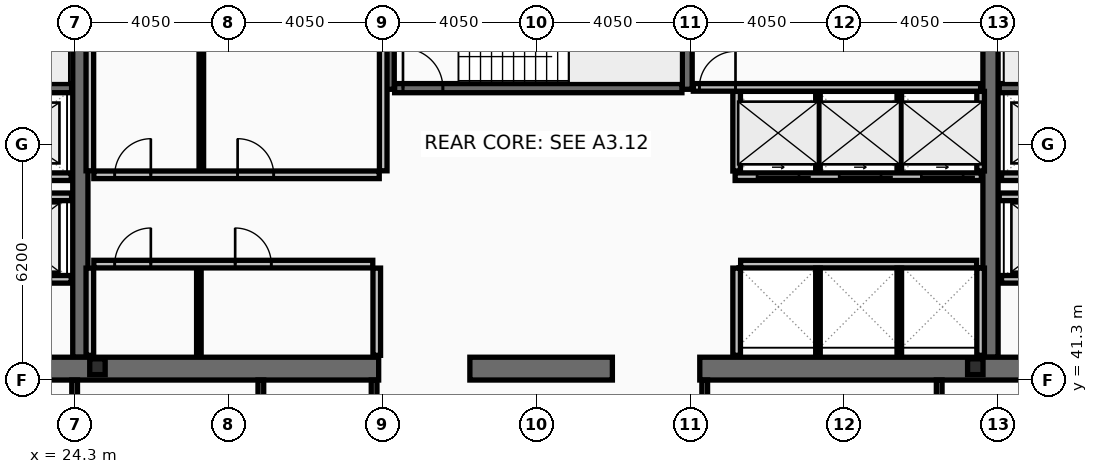
"""IFC4 building model, lengths in metres.
Left out: names, types, materials, properties, quantities, classifications, styles, units other than length and angle.
Written with IfcOpenShell. Run it as: python <this file> out.ifc"""

import sys

from ifc_helpers import new_model, si_unit, direction, frame, frame_2d, origin, origin_2d, place, context, subcontext, project, spatial, rectangle, i_section, extrude, element, fill, save


model = new_model("IFC4")
c1 = context("Model", 3, precision=1e-05, world=origin(), true_north=direction((0.0, 1.0)))
c2 = subcontext(c1, "Body", "Model", "MODEL_VIEW")
j1 = project(units=[si_unit("LENGTHUNIT", "METRE"), si_unit("PLANEANGLEUNIT", "RADIAN")], contexts=[c1])
p1 = place(None, origin())
s1 = spatial("IfcSite", under=j1, at=p1, CompositionType="ELEMENT")
p2 = place(p1, origin())
s2 = spatial("IfcBuilding", under=s1, at=p2, CompositionType="ELEMENT")
p3 = place(p2, frame((0.0, 0.0, 253.4)))
s3 = spatial("IfcBuildingStorey", under=s2, at=p3, CompositionType="ELEMENT", Elevation=253.4)
for number, where, z_axis, x_axis in (
    (1, (24.45, 41.9, 0.0), (0.0, 0.0, 1.0), (0.0, 1.0, 0.0)),
    (2, (48.4, 41.9, 0.0), (0.0, 0.0, 1.0), (0.0, 1.0, 0.0)),
):
    element("IfcWall", number, at=place(p3, frame(where, z_axis=z_axis, x_axis=x_axis)), inside=s3, PredefinedType="SHEAR", context=c2, shape_type="SweptSolid", body=[
        extrude(rectangle(XDim=11.2, YDim=0.4, at=frame_2d((5.6, 0.0))), origin(), (0.0, 0.0, 1.0), 3.38),
    ])
p4 = place(p3, frame((32.3, 41.6, 0.0), z_axis=(0.0, 0.0, 1.0), x_axis=(-1.0, 0.0, 0.0)))
e3 = element("IfcWall", 3, at=p4, inside=s3, PredefinedType="SHEAR", context=c2, shape_type="SweptSolid", body=[
    extrude(rectangle(XDim=11.45, YDim=0.6, at=frame_2d((5.725, 0.0))), origin(), (0.0, 0.0, 1.0), 3.38),
])
p5 = place(p3, frame((38.45, 41.6, 0.0), z_axis=(0.0, 0.0, 1.0), x_axis=(-1.0, 0.0, 0.0)))
e4 = element("IfcWall", 4, at=p5, inside=s3, PredefinedType="SHEAR", context=c2, shape_type="SweptSolid", body=[
    extrude(rectangle(XDim=3.75, YDim=0.6, at=frame_2d((1.875, 0.0))), origin(), (0.0, 0.0, 1.0), 3.38),
])
p6 = place(p3, frame((52.05, 41.6, 0.0), z_axis=(0.0, 0.0, 1.0), x_axis=(-1.0, 0.0, 0.0)))
e5 = element("IfcWall", 5, at=p6, inside=s3, PredefinedType="SHEAR", context=c2, shape_type="SweptSolid", body=[
    extrude(rectangle(XDim=11.3, YDim=0.6, at=frame_2d((5.65, 0.0))), origin(), (0.0, 0.0, 1.0), 3.38),
])
for number, where, z_axis, x_axis in (
    (6, (32.58, 48.95, 0.0), (0.0, 0.0, 1.0), (0.0, 1.0, 0.0)),
    (7, (40.42, 48.95, 0.0), (0.0, 0.0, 1.0), (0.0, 1.0, 0.0)),
):
    element("IfcWall", number, at=place(p3, frame(where, z_axis=z_axis, x_axis=x_axis)), inside=s3, PredefinedType="SHEAR", context=c2, shape_type="SweptSolid", body=[
        extrude(rectangle(XDim=4.15, YDim=0.26, at=frame_2d((2.075, 0.0))), origin(), (0.0, 0.0, 1.0), 3.38),
    ])
p7 = place(p3, frame((16.8, 48.98, 0.0), z_axis=(0.0, 0.0, 1.0), x_axis=(1.0, 0.0, 0.0)))
e8 = element("IfcWall", 8, at=p7, inside=s3, PredefinedType="SHEAR", context=c2, shape_type="SweptSolid", body=[
    extrude(rectangle(XDim=7.42, YDim=0.24, at=frame_2d((3.71, 0.0))), origin(), (0.0, 0.0, 1.0), 3.38),
])
p8 = place(p7, frame((0.22, 0.0, 0.0)))
e9 = element("IfcOpeningElement", 9, at=p8, cuts=e8, PredefinedType="OPENING", context=c2, shape_type="SweptSolid", body=[
    extrude(rectangle(XDim=1.05, YDim=2.15, at=frame_2d((0.525, 1.075))), frame((0.0, 0.13, 0.0), z_axis=(0.0, -1.0, 0.0), x_axis=(1.0, 0.0, 0.0)), (0.0, 0.0, 1.0), 0.26),
])
p9 = place(p3, frame((48.63, 48.98, 0.0), z_axis=(0.0, 0.0, 1.0), x_axis=(1.0, 0.0, 0.0)))
e10 = element("IfcWall", 10, at=p9, inside=s3, PredefinedType="SHEAR", context=c2, shape_type="SweptSolid", body=[
    extrude(rectangle(XDim=7.47, YDim=0.24, at=frame_2d((3.735, 0.0))), origin(), (0.0, 0.0, 1.0), 3.38),
])
p10 = place(p9, frame((6.2, 0.0, 0.0)))
e11 = element("IfcOpeningElement", 11, at=p10, cuts=e10, PredefinedType="OPENING", context=c2, shape_type="SweptSolid", body=[
    extrude(rectangle(XDim=1.05, YDim=2.15, at=frame_2d((0.525, 1.075))), frame((0.0, 0.13, 0.0), z_axis=(0.0, -1.0, 0.0), x_axis=(1.0, 0.0, 0.0)), (0.0, 0.0, 1.0), 0.26),
])
p11 = place(p3, frame((32.72, 48.98, 0.0), z_axis=(0.0, 0.0, 1.0), x_axis=(1.0, 0.0, 0.0)))
e12 = element("IfcWall", 12, at=p11, inside=s3, PredefinedType="SHEAR", context=c2, shape_type="SweptSolid", body=[
    extrude(rectangle(XDim=7.56, YDim=0.24, at=frame_2d((3.78, 0.0))), origin(), (0.0, 0.0, 1.0), 3.38),
])
p12 = place(p11, frame((0.22, 0.0, 0.0)))
e13 = element("IfcOpeningElement", 13, at=p12, cuts=e12, PredefinedType="OPENING", context=c2, shape_type="SweptSolid", body=[
    extrude(rectangle(XDim=1.05, YDim=2.15, at=frame_2d((0.525, 1.075))), frame((0.0, 0.13, 0.0), z_axis=(0.0, -1.0, 0.0), x_axis=(1.0, 0.0, 0.0)), (0.0, 0.0, 1.0), 0.26),
])
for number, where, z_axis, x_axis in (
    (14, (24.9, 41.65, 0.0), (0.0, 0.0, 1.0), (1.0, 0.0, 0.0)),
    (15, (48.0, 41.65, 0.0), (0.0, 0.0, 1.0), (1.0, 0.0, 0.0)),
):
    element("IfcColumn", number, at=place(p3, frame(where, z_axis=z_axis, x_axis=x_axis)), inside=s3, PredefinedType="COLUMN", context=c2, shape_type="SweptSolid", body=[
        extrude(i_section(OverallWidth=0.406, OverallDepth=0.416, WebThickness=0.03, FlangeThickness=0.048, at=origin_2d()), origin(), (0.0, 0.0, 1.0), 3.6),
    ])
p13 = place(p3, frame((51.61, 43.95, 0.0), z_axis=(0.0, 0.0, 1.0), x_axis=(-1.0, 0.0, 0.0)))
e16 = element("IfcWall", 16, at=p13, inside=s3, PredefinedType="PARTITIONING", context=c2, shape_type="SweptSolid", body=[
    extrude(rectangle(XDim=2.92, YDim=0.2, at=frame_2d((1.46, 0.0))), origin(), (0.0, 0.0, 1.0), 3.38),
])
p14 = place(p13, frame((0.81, 0.0, 0.0)))
e17 = element("IfcOpeningElement", 17, at=p14, cuts=e16, PredefinedType="OPENING", context=c2, shape_type="SweptSolid", body=[
    extrude(rectangle(XDim=1.3, YDim=2.18, at=frame_2d((0.65, 1.09))), frame((0.0, 0.11, 0.0), z_axis=(0.0, -1.0, 0.0), x_axis=(1.0, 0.0, 0.0)), (0.0, 0.0, 1.0), 0.22),
])
p15 = place(p3, frame((24.21, 43.95, 0.0), z_axis=(0.0, 0.0, 1.0), x_axis=(-1.0, 0.0, 0.0)))
e18 = element("IfcWall", 18, at=p15, inside=s3, PredefinedType="PARTITIONING", context=c2, shape_type="SweptSolid", body=[
    extrude(rectangle(XDim=2.97, YDim=0.2, at=frame_2d((1.485, 0.0))), origin(), (0.0, 0.0, 1.0), 3.38),
])
p16 = place(p15, frame((0.86, 0.0, 0.0)))
e19 = element("IfcOpeningElement", 19, at=p16, cuts=e18, PredefinedType="OPENING", context=c2, shape_type="SweptSolid", body=[
    extrude(rectangle(XDim=1.3, YDim=2.18, at=frame_2d((0.65, 1.09))), frame((0.0, 0.11, 0.0), z_axis=(0.0, -1.0, 0.0), x_axis=(1.0, 0.0, 0.0)), (0.0, 0.0, 1.0), 0.22),
])
p17 = place(p3, frame((51.61, 46.65, 0.0), z_axis=(0.0, 0.0, 1.0), x_axis=(-1.0, 0.0, 0.0)))
e20 = element("IfcWall", 20, at=p17, inside=s3, PredefinedType="PARTITIONING", context=c2, shape_type="SweptSolid", body=[
    extrude(rectangle(XDim=2.92, YDim=0.2, at=frame_2d((1.46, 0.0))), origin(), (0.0, 0.0, 1.0), 3.38),
])
p18 = place(p17, frame((0.86, 0.0, 0.0)))
e21 = element("IfcOpeningElement", 21, at=p18, cuts=e20, PredefinedType="OPENING", context=c2, shape_type="SweptSolid", body=[
    extrude(rectangle(XDim=1.2, YDim=2.18, at=frame_2d((0.6, 1.09))), frame((0.0, 0.11, 0.0), z_axis=(0.0, -1.0, 0.0), x_axis=(1.0, 0.0, 0.0)), (0.0, 0.0, 1.0), 0.22),
])
p19 = place(p3, frame((24.21, 46.65, 0.0), z_axis=(0.0, 0.0, 1.0), x_axis=(-1.0, 0.0, 0.0)))
e22 = element("IfcWall", 22, at=p19, inside=s3, PredefinedType="PARTITIONING", context=c2, shape_type="SweptSolid", body=[
    extrude(rectangle(XDim=2.97, YDim=0.2, at=frame_2d((1.485, 0.0))), origin(), (0.0, 0.0, 1.0), 3.38),
])
p20 = place(p19, frame((0.91, 0.0, 0.0)))
e23 = element("IfcOpeningElement", 23, at=p20, cuts=e22, PredefinedType="OPENING", context=c2, shape_type="SweptSolid", body=[
    extrude(rectangle(XDim=1.2, YDim=2.18, at=frame_2d((0.6, 1.09))), frame((0.0, 0.11, 0.0), z_axis=(0.0, -1.0, 0.0), x_axis=(1.0, 0.0, 0.0)), (0.0, 0.0, 1.0), 0.22),
])
p21 = place(p3, frame((48.16, 46.65, 0.0), z_axis=(0.0, 0.0, 1.0), x_axis=(-1.0, 0.0, 0.0)))
e24 = element("IfcWall", 24, at=p21, inside=s3, PredefinedType="PARTITIONING", context=c2, shape_type="SweptSolid", body=[
    extrude(rectangle(XDim=6.48, YDim=0.2, at=frame_2d((3.24, 0.0))), origin(), (0.0, 0.0, 1.0), 3.38),
])
p22 = place(p21, frame((4.8, 0.0, 0.0)))
e25 = element("IfcOpeningElement", 25, at=p22, cuts=e24, PredefinedType="OPENING", context=c2, shape_type="SweptSolid", body=[
    extrude(rectangle(XDim=1.1, YDim=2.18, at=frame_2d((0.55, 1.09))), frame((0.0, 0.11, 0.0), z_axis=(0.0, -1.0, 0.0), x_axis=(1.0, 0.0, 0.0)), (0.0, 0.0, 1.0), 0.22),
])
p23 = place(p21, frame((2.64, 0.0, 0.0)))
e26 = element("IfcOpeningElement", 26, at=p23, cuts=e24, PredefinedType="OPENING", context=c2, shape_type="SweptSolid", body=[
    extrude(rectangle(XDim=1.1, YDim=2.18, at=frame_2d((0.55, 1.09))), frame((0.0, 0.11, 0.0), z_axis=(0.0, -1.0, 0.0), x_axis=(1.0, 0.0, 0.0)), (0.0, 0.0, 1.0), 0.22),
])
p24 = place(p21, frame((0.48, 0.0, 0.0)))
e27 = element("IfcOpeningElement", 27, at=p24, cuts=e24, PredefinedType="OPENING", context=c2, shape_type="SweptSolid", body=[
    extrude(rectangle(XDim=1.1, YDim=2.18, at=frame_2d((0.55, 1.09))), frame((0.0, 0.11, 0.0), z_axis=(0.0, -1.0, 0.0), x_axis=(1.0, 0.0, 0.0)), (0.0, 0.0, 1.0), 0.22),
])
p25 = place(p3, frame((21.2, 46.12, 0.0), z_axis=(0.0, 0.0, 1.0), x_axis=(1.0, 0.0, 0.0)))
e28 = element("IfcWall", 28, at=p25, inside=s3, PredefinedType="PARTITIONING", context=c2, shape_type="SweptSolid", body=[
    extrude(rectangle(XDim=3.02, YDim=0.2, at=frame_2d((1.51, 0.0))), origin(), (0.0, 0.0, 1.0), 3.38),
])
p26 = place(p3, frame((48.63, 46.12, 0.0), z_axis=(0.0, 0.0, 1.0), x_axis=(1.0, 0.0, 0.0)))
e29 = element("IfcWall", 29, at=p26, inside=s3, PredefinedType="PARTITIONING", context=c2, shape_type="SweptSolid", body=[
    extrude(rectangle(XDim=3.07, YDim=0.2, at=frame_2d((1.535, 0.0))), origin(), (0.0, 0.0, 1.0), 3.38),
])
for number, where, z_axis, x_axis in (
    (30, (24.7, 46.805, 0.0), (0.0, 0.0, 1.0), (0.0, 1.0, 0.0)),
    (31, (32.42, 46.805, 0.0), (0.0, 0.0, 1.0), (0.0, 1.0, 0.0)),
):
    element("IfcWall", number, at=place(p3, frame(where, z_axis=z_axis, x_axis=x_axis)), inside=s3, PredefinedType="PARTITIONING", context=c2, shape_type="SweptSolid", body=[
        extrude(rectangle(XDim=5.99, YDim=0.2, at=frame_2d((2.995, 0.0))), origin(), (0.0, 0.0, 1.0), 3.38),
    ])
p27 = place(p3, frame((27.634, 46.805, 0.0), z_axis=(0.0, 0.0, 1.0), x_axis=(0.0, 1.0, 0.0)))
e32 = element("IfcWall", 32, at=p27, inside=s3, PredefinedType="PARTITIONING", context=c2, shape_type="SweptSolid", body=[
    extrude(rectangle(XDim=5.99, YDim=0.12, at=frame_2d((2.995, 0.0))), origin(), (0.0, 0.0, 1.0), 3.38),
])
p28 = place(p3, frame((24.805, 46.7, 0.0), z_axis=(0.0, 0.0, 1.0), x_axis=(1.0, 0.0, 0.0)))
e33 = element("IfcWall", 33, at=p28, inside=s3, PredefinedType="PARTITIONING", context=c2, shape_type="SweptSolid", body=[
    extrude(rectangle(XDim=7.51, YDim=0.2, at=frame_2d((3.755, 0.0))), origin(), (0.0, 0.0, 1.0), 3.38),
])
p29 = place(p28, frame((0.55, 0.0, 0.0)))
e34 = element("IfcOpeningElement", 34, at=p29, cuts=e33, PredefinedType="OPENING", context=c2, shape_type="SweptSolid", body=[
    extrude(rectangle(XDim=0.95, YDim=2.1, at=frame_2d((0.475, 1.05))), frame((0.0, 0.11, 0.0), z_axis=(0.0, -1.0, 0.0), x_axis=(1.0, 0.0, 0.0)), (0.0, 0.0, 1.0), 0.22),
])
p30 = place(p28, frame((3.784, 0.0, 0.0)))
e35 = element("IfcOpeningElement", 35, at=p30, cuts=e33, PredefinedType="OPENING", context=c2, shape_type="SweptSolid", body=[
    extrude(rectangle(XDim=0.95, YDim=2.1, at=frame_2d((0.475, 1.05))), frame((0.0, 0.11, 0.0), z_axis=(0.0, -1.0, 0.0), x_axis=(1.0, 0.0, 0.0)), (0.0, 0.0, 1.0), 0.22),
])
for number, where, z_axis, x_axis in (
    (36, (24.7, 41.95, 0.0), (0.0, 0.0, 1.0), (0.0, 1.0, 0.0)),
    (37, (32.25, 41.95, 0.0), (0.0, 0.0, 1.0), (0.0, 1.0, 0.0)),
):
    element("IfcWall", number, at=place(p3, frame(where, z_axis=z_axis, x_axis=x_axis)), inside=s3, PredefinedType="PARTITIONING", context=c2, shape_type="SweptSolid", body=[
        extrude(rectangle(XDim=2.295, YDim=0.2, at=frame_2d((1.147, 0.0))), origin(), (0.0, 0.0, 1.0), 3.38),
    ])
p31 = place(p3, frame((27.569, 41.95, 0.0), z_axis=(0.0, 0.0, 1.0), x_axis=(0.0, 1.0, 0.0)))
e38 = element("IfcWall", 38, at=p31, inside=s3, PredefinedType="PARTITIONING", context=c2, shape_type="SweptSolid", body=[
    extrude(rectangle(XDim=2.295, YDim=0.12, at=frame_2d((1.147, 0.0))), origin(), (0.0, 0.0, 1.0), 3.38),
])
p32 = place(p3, frame((24.805, 44.35, 0.0), z_axis=(0.0, 0.0, 1.0), x_axis=(1.0, 0.0, 0.0)))
e39 = element("IfcWall", 39, at=p32, inside=s3, PredefinedType="PARTITIONING", context=c2, shape_type="SweptSolid", body=[
    extrude(rectangle(XDim=7.34, YDim=0.2, at=frame_2d((3.67, 0.0))), origin(), (0.0, 0.0, 1.0), 3.38),
])
p33 = place(p32, frame((0.55, 0.0, 0.0)))
e40 = element("IfcOpeningElement", 40, at=p33, cuts=e39, PredefinedType="OPENING", context=c2, shape_type="SweptSolid", body=[
    extrude(rectangle(XDim=0.95, YDim=2.1, at=frame_2d((0.475, 1.05))), frame((0.0, 0.11, 0.0), z_axis=(0.0, -1.0, 0.0), x_axis=(1.0, 0.0, 0.0)), (0.0, 0.0, 1.0), 0.22),
])
p34 = place(p32, frame((3.719, 0.0, 0.0)))
e41 = element("IfcOpeningElement", 41, at=p34, cuts=e39, PredefinedType="OPENING", context=c2, shape_type="SweptSolid", body=[
    extrude(rectangle(XDim=0.95, YDim=2.1, at=frame_2d((0.475, 1.05))), frame((0.0, 0.11, 0.0), z_axis=(0.0, -1.0, 0.0), x_axis=(1.0, 0.0, 0.0)), (0.0, 0.0, 1.0), 0.22),
])
for number, where, z_axis, x_axis in (
    (42, (41.72, 46.8, 0.0), (0.0, 0.0, 1.0), (0.0, 1.0, 0.0)),
    (43, (48.14, 46.8, 0.0), (0.0, 0.0, 1.0), (0.0, 1.0, 0.0)),
):
    element("IfcWall", number, at=place(p3, frame(where, z_axis=z_axis, x_axis=x_axis)), inside=s3, PredefinedType="PARTITIONING", context=c2, shape_type="SweptSolid", body=[
        extrude(rectangle(XDim=2.095, YDim=0.2, at=frame_2d((1.047, 0.0))), origin(), (0.0, 0.0, 1.0), 3.38),
    ])
for number, where, z_axis, x_axis in (
    (44, (43.86, 46.8, 0.0), (0.0, 0.0, 1.0), (0.0, 1.0, 0.0)),
    (45, (46.0, 46.8, 0.0), (0.0, 0.0, 1.0), (0.0, 1.0, 0.0)),
):
    element("IfcWall", number, at=place(p3, frame(where, z_axis=z_axis, x_axis=x_axis)), inside=s3, PredefinedType="PARTITIONING", context=c2, shape_type="SweptSolid", body=[
        extrude(rectangle(XDim=2.095, YDim=0.12, at=frame_2d((1.047, 0.0))), origin(), (0.0, 0.0, 1.0), 3.38),
    ])
p35 = place(p3, frame((41.825, 44.35, 0.0), z_axis=(0.0, 0.0, 1.0), x_axis=(1.0, 0.0, 0.0)))
e46 = element("IfcWall", 46, at=p35, inside=s3, PredefinedType="PARTITIONING", context=c2, shape_type="SweptSolid", body=[
    extrude(rectangle(XDim=6.21, YDim=0.2, at=frame_2d((3.105, 0.0))), origin(), (0.0, 0.0, 1.0), 3.38),
])
for number, where, z_axis, x_axis in (
    (47, (41.72, 41.95, 0.0), (0.0, 0.0, 1.0), (0.0, 1.0, 0.0)),
    (48, (48.14, 41.95, 0.0), (0.0, 0.0, 1.0), (0.0, 1.0, 0.0)),
):
    element("IfcWall", number, at=place(p3, frame(where, z_axis=z_axis, x_axis=x_axis)), inside=s3, PredefinedType="PARTITIONING", context=c2, shape_type="SweptSolid", body=[
        extrude(rectangle(XDim=2.295, YDim=0.2, at=frame_2d((1.147, 0.0))), origin(), (0.0, 0.0, 1.0), 3.38),
    ])
for number, where, z_axis, x_axis in (
    (49, (43.86, 41.95, 0.0), (0.0, 0.0, 1.0), (0.0, 1.0, 0.0)),
    (50, (46.0, 41.95, 0.0), (0.0, 0.0, 1.0), (0.0, 1.0, 0.0)),
):
    element("IfcWall", number, at=place(p3, frame(where, z_axis=z_axis, x_axis=x_axis)), inside=s3, PredefinedType="PARTITIONING", context=c2, shape_type="SweptSolid", body=[
        extrude(rectangle(XDim=2.295, YDim=0.12, at=frame_2d((1.147, 0.0))), origin(), (0.0, 0.0, 1.0), 3.38),
    ])
p36 = place(p3, frame((40.58, 49.0, 0.0), z_axis=(0.0, 0.0, 1.0), x_axis=(1.0, 0.0, 0.0)))
e51 = element("IfcWall", 51, at=p36, inside=s3, PredefinedType="PARTITIONING", context=c2, shape_type="SweptSolid", body=[
    extrude(rectangle(XDim=7.56, YDim=0.2, at=frame_2d((3.78, 0.0))), origin(), (0.0, 0.0, 1.0), 3.38),
])
p37 = place(p36, frame((0.16, 0.0, 0.0)))
e52 = element("IfcOpeningElement", 52, at=p37, cuts=e51, PredefinedType="OPENING", context=c2, shape_type="SweptSolid", body=[
    extrude(rectangle(XDim=0.95, YDim=2.1, at=frame_2d((0.475, 1.05))), frame((0.0, 0.11, 0.0), z_axis=(0.0, -1.0, 0.0), x_axis=(1.0, 0.0, 0.0)), (0.0, 0.0, 1.0), 0.22),
])
for number, where, z_axis, x_axis in (
    (53, (24.3, 38.28, 0.0), (0.0, 0.0, 1.0), (0.0, 1.0, 0.0)),
    (54, (29.2, 38.28, 0.0), (0.0, 0.0, 1.0), (0.0, 1.0, 0.0)),
    (55, (32.18, 38.28, 0.0), (0.0, 0.0, 1.0), (0.0, 1.0, 0.0)),
    (56, (40.88, 38.28, 0.0), (0.0, 0.0, 1.0), (0.0, 1.0, 0.0)),
    (57, (47.05, 38.28, 0.0), (0.0, 0.0, 1.0), (0.0, 1.0, 0.0)),
):
    element("IfcWall", number, at=place(p3, frame(where, z_axis=z_axis, x_axis=x_axis)), inside=s3, PredefinedType="PARTITIONING", context=c2, shape_type="SweptSolid", body=[
        extrude(rectangle(XDim=3.02, YDim=0.15, at=frame_2d((1.51, 0.0))), origin(), (0.0, 0.0, 1.0), 3.38),
    ])
p38 = place(p12, origin())
e58 = element("IfcDoor", 58, at=p38, inside=s3, OperationType="SINGLE_SWING_LEFT", PredefinedType="DOOR", context=c2, shape_type="SweptSolid", body=[
    extrude(rectangle(XDim=1.05, YDim=2.15, at=frame_2d((0.525, 1.075))), frame((0.0, 0.025, 0.0), z_axis=(0.0, -1.0, 0.0), x_axis=(1.0, 0.0, 0.0)), (0.0, 0.0, 1.0), 0.05),
])
fill(e13, e58)
p39 = place(p22, origin())
e59 = element("IfcDoor", 59, at=p39, inside=s3, OperationType="SLIDING_TO_LEFT", PredefinedType="DOOR", context=c2, shape_type="SweptSolid", body=[
    extrude(rectangle(XDim=1.1, YDim=2.18, at=frame_2d((0.55, 1.09))), frame((0.0, 0.025, 0.0), z_axis=(0.0, -1.0, 0.0), x_axis=(1.0, 0.0, 0.0)), (0.0, 0.0, 1.0), 0.05),
])
fill(e25, e59)
p40 = place(p23, origin())
e60 = element("IfcDoor", 60, at=p40, inside=s3, OperationType="SLIDING_TO_LEFT", PredefinedType="DOOR", context=c2, shape_type="SweptSolid", body=[
    extrude(rectangle(XDim=1.1, YDim=2.18, at=frame_2d((0.55, 1.09))), frame((0.0, 0.025, 0.0), z_axis=(0.0, -1.0, 0.0), x_axis=(1.0, 0.0, 0.0)), (0.0, 0.0, 1.0), 0.05),
])
fill(e26, e60)
p41 = place(p24, origin())
e61 = element("IfcDoor", 61, at=p41, inside=s3, OperationType="SLIDING_TO_LEFT", PredefinedType="DOOR", context=c2, shape_type="SweptSolid", body=[
    extrude(rectangle(XDim=1.1, YDim=2.18, at=frame_2d((0.55, 1.09))), frame((0.0, 0.025, 0.0), z_axis=(0.0, -1.0, 0.0), x_axis=(1.0, 0.0, 0.0)), (0.0, 0.0, 1.0), 0.05),
])
fill(e27, e61)
p42 = place(p29, origin())
e62 = element("IfcDoor", 62, at=p42, inside=s3, OperationType="SINGLE_SWING_RIGHT", PredefinedType="DOOR", context=c2, shape_type="SweptSolid", body=[
    extrude(rectangle(XDim=0.95, YDim=2.1, at=frame_2d((0.475, 1.05))), frame((0.0, 0.025, 0.0), z_axis=(0.0, -1.0, 0.0), x_axis=(1.0, 0.0, 0.0)), (0.0, 0.0, 1.0), 0.05),
])
fill(e34, e62)
p43 = place(p30, origin())
e63 = element("IfcDoor", 63, at=p43, inside=s3, OperationType="SINGLE_SWING_LEFT", PredefinedType="DOOR", context=c2, shape_type="SweptSolid", body=[
    extrude(rectangle(XDim=0.95, YDim=2.1, at=frame_2d((0.475, 1.05))), frame((0.0, 0.025, 0.0), z_axis=(0.0, -1.0, 0.0), x_axis=(1.0, 0.0, 0.0)), (0.0, 0.0, 1.0), 0.05),
])
fill(e35, e63)
p44 = place(p33, origin())
e64 = element("IfcDoor", 64, at=p44, inside=s3, OperationType="SINGLE_SWING_RIGHT", PredefinedType="DOOR", context=c2, shape_type="SweptSolid", body=[
    extrude(rectangle(XDim=0.95, YDim=2.1, at=frame_2d((0.475, 1.05))), frame((0.0, 0.025, 0.0), z_axis=(0.0, -1.0, 0.0), x_axis=(1.0, 0.0, 0.0)), (0.0, 0.0, 1.0), 0.05),
])
fill(e40, e64)
p45 = place(p34, origin())
e65 = element("IfcDoor", 65, at=p45, inside=s3, OperationType="SINGLE_SWING_LEFT", PredefinedType="DOOR", context=c2, shape_type="SweptSolid", body=[
    extrude(rectangle(XDim=0.95, YDim=2.1, at=frame_2d((0.475, 1.05))), frame((0.0, 0.025, 0.0), z_axis=(0.0, -1.0, 0.0), x_axis=(1.0, 0.0, 0.0)), (0.0, 0.0, 1.0), 0.05),
])
fill(e41, e65)
p46 = place(p37, origin())
e66 = element("IfcDoor", 66, at=p46, inside=s3, OperationType="SINGLE_SWING_RIGHT", PredefinedType="DOOR", context=c2, shape_type="SweptSolid", body=[
    extrude(rectangle(XDim=0.95, YDim=2.1, at=frame_2d((0.475, 1.05))), frame((0.0, 0.025, 0.0), z_axis=(0.0, -1.0, 0.0), x_axis=(1.0, 0.0, 0.0)), (0.0, 0.0, 1.0), 0.05),
])
fill(e52, e66)
save(model, sys.argv[1])
